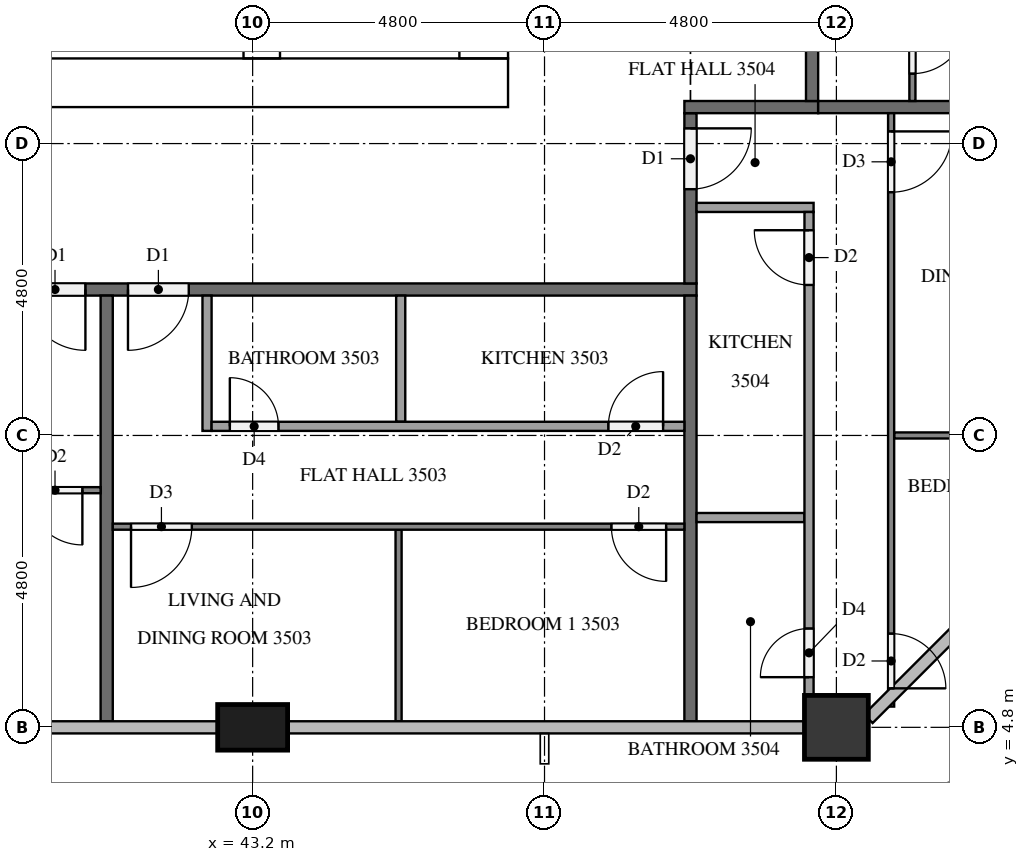
"""IFC4 building model, lengths in metres.
Left out: names, types, materials, properties, quantities, classifications, styles, units other than length and angle.
Written with IfcOpenShell. Run it as: python <this file> out.ifc"""

import sys

from ifc_helpers import new_model, si_unit, direction, frame, frame_2d, origin, origin_2d, place, context, subcontext, project, spatial, rectangle, extrude, element, fill, save


model = new_model("IFC4")
c1 = context("Model", 3, precision=1e-05, world=origin(), true_north=direction((0.0, 1.0)))
c2 = subcontext(c1, "Body", "Model", "MODEL_VIEW")
j1 = project(units=[si_unit("LENGTHUNIT", "METRE"), si_unit("PLANEANGLEUNIT", "RADIAN")], contexts=[c1])
p1 = place(None, origin())
s1 = spatial("IfcSite", under=j1, at=p1, CompositionType="ELEMENT")
p2 = place(p1, origin())
s2 = spatial("IfcBuilding", under=s1, at=p2, CompositionType="ELEMENT")
p3 = place(p2, frame((0.0, 0.0, 136.6)))
s3 = spatial("IfcBuildingStorey", under=s2, at=p3, CompositionType="ELEMENT", Elevation=136.6)
p4 = place(p3, frame((15.0, 15.4, 0.0), z_axis=(0.0, 0.0, 1.0), x_axis=(1.0, 0.0, 0.0)))
e1 = element("IfcWall", 1, at=p4, inside=s3, PredefinedType="SHEAR", context=c2, shape_type="SweptSolid", body=[
    extrude(rectangle(XDim=32.4, YDim=0.8, at=frame_2d((16.2, 0.0))), origin(), (0.0, 0.0, 1.0), 3.2),
])
p5 = place(p4, frame((15.3, 0.0, 0.0)))
e2 = element("IfcOpeningElement", 2, at=p5, cuts=e1, PredefinedType="OPENING", context=c2, shape_type="SweptSolid", body=[
    extrude(rectangle(XDim=1.8, YDim=2.1, at=frame_2d((0.9, 1.05))), frame((0.0, 0.41, 0.0), z_axis=(0.0, -1.0, 0.0), x_axis=(1.0, 0.0, 0.0)), (0.0, 0.0, 1.0), 0.82),
])
p6 = place(p3, frame((47.0, 15.8, 0.0), z_axis=(0.0, 0.0, 1.0), x_axis=(0.0, 1.0, 0.0)))
e3 = element("IfcWall", 3, at=p6, inside=s3, PredefinedType="SHEAR", context=c2, shape_type="SweptSolid", body=[
    extrude(rectangle(XDim=21.2, YDim=0.8, at=frame_2d((10.6, 0.0))), origin(), (0.0, 0.0, 1.0), 3.2),
])
p7 = place(p6, frame((10.3, 0.0, 0.0)))
e4 = element("IfcOpeningElement", 4, at=p7, cuts=e3, PredefinedType="OPENING", context=c2, shape_type="SweptSolid", body=[
    extrude(rectangle(XDim=1.2, YDim=2.1, at=frame_2d((0.6, 1.05))), frame((0.0, 0.41, 0.0), z_axis=(0.0, -1.0, 0.0), x_axis=(1.0, 0.0, 0.0)), (0.0, 0.0, 1.0), 0.82),
])
p8 = place(p3, frame((43.35, 15.8, 0.0), z_axis=(0.0, 0.0, 1.0), x_axis=(0.0, 1.0, 0.0)))
e5 = element("IfcWall", 5, at=p8, inside=s3, PredefinedType="SHEAR", context=c2, shape_type="SweptSolid", body=[
    extrude(rectangle(XDim=8.45, YDim=0.6, at=frame_2d((4.225, 0.0))), origin(), (0.0, 0.0, 1.0), 3.2),
])
p9 = place(p8, frame((0.4, 0.0, 0.0)))
e6 = element("IfcOpeningElement", 6, at=p9, cuts=e5, PredefinedType="OPENING", context=c2, shape_type="SweptSolid", body=[
    extrude(rectangle(XDim=1.2, YDim=2.1, at=frame_2d((0.6, 1.05))), frame((0.0, 0.31, 0.0), z_axis=(0.0, -1.0, 0.0), x_axis=(1.0, 0.0, 0.0)), (0.0, 0.0, 1.0), 0.62),
])
p10 = place(p3, frame((43.2, 4.8, 0.0), z_axis=(0.0, 0.0, 1.0), x_axis=(1.0, 0.0, 0.0)))
e7 = element("IfcColumn", 7, at=p10, inside=s3, PredefinedType="COLUMN", context=c2, shape_type="SweptSolid", body=[
    extrude(rectangle(XDim=1.15, YDim=0.75, at=origin_2d()), origin(), (0.0, 0.0, 1.0), 3.2),
])
p11 = place(p3, frame((52.8, 4.8, 0.0), z_axis=(0.0, 0.0, 1.0), x_axis=(1.0, 0.0, 0.0)))
e8 = element("IfcColumn", 8, at=p11, inside=s3, PredefinedType="COLUMN", context=c2, shape_type="SweptSolid", body=[
    extrude(rectangle(XDim=1.05, YDim=1.05, at=origin_2d()), origin(), (0.0, 0.0, 1.0), 3.2),
])
p12 = place(p3, frame((50.5, 12.0, 0.0), z_axis=(0.0, 0.0, 1.0), x_axis=(-1.0, 0.0, 0.0)))
e9 = element("IfcWall", 9, at=p12, inside=s3, PredefinedType="PARTITIONING", context=c2, shape_type="SweptSolid", body=[
    extrude(rectangle(XDim=38.6, YDim=0.2, at=frame_2d((19.3, 0.0))), origin(), (0.0, 0.0, 1.0), 3.2),
])
p13 = place(p12, frame((24.45, 0.0, 0.0)))
e10 = element("IfcOpeningElement", 10, at=p13, cuts=e9, PredefinedType="OPENING", context=c2, shape_type="SweptSolid", body=[
    extrude(rectangle(XDim=1.0, YDim=2.1, at=frame_2d((0.5, 1.05))), frame((0.0, 0.11, 0.0), z_axis=(0.0, -1.0, 0.0), x_axis=(1.0, 0.0, 0.0)), (0.0, 0.0, 1.0), 0.22),
])
p14 = place(p12, frame((10.05, 0.0, 0.0)))
e11 = element("IfcOpeningElement", 11, at=p14, cuts=e9, PredefinedType="OPENING", context=c2, shape_type="SweptSolid", body=[
    extrude(rectangle(XDim=1.0, YDim=2.1, at=frame_2d((0.5, 1.05))), frame((0.0, 0.11, 0.0), z_axis=(0.0, -1.0, 0.0), x_axis=(1.0, 0.0, 0.0)), (0.0, 0.0, 1.0), 0.22),
])
p15 = place(p12, frame((8.35, 0.0, 0.0)))
e12 = element("IfcOpeningElement", 12, at=p15, cuts=e9, PredefinedType="OPENING", context=c2, shape_type="SweptSolid", body=[
    extrude(rectangle(XDim=1.0, YDim=2.1, at=frame_2d((0.5, 1.05))), frame((0.0, 0.11, 0.0), z_axis=(0.0, -1.0, 0.0), x_axis=(1.0, 0.0, 0.0)), (0.0, 0.0, 1.0), 0.22),
])
p16 = place(p3, frame((50.4, 14.9, 0.0), z_axis=(0.0, 0.0, 1.0), x_axis=(0.0, -1.0, 0.0)))
e13 = element("IfcWall", 13, at=p16, inside=s3, PredefinedType="PARTITIONING", context=c2, shape_type="SweptSolid", body=[
    extrude(rectangle(XDim=2.8, YDim=0.2, at=frame_2d((1.4, 0.0))), origin(), (0.0, 0.0, 1.0), 3.2),
])
p17 = place(p16, frame((0.25, 0.0, 0.0)))
e14 = element("IfcOpeningElement", 14, at=p17, cuts=e13, PredefinedType="OPENING", context=c2, shape_type="SweptSolid", body=[
    extrude(rectangle(XDim=1.0, YDim=2.1, at=frame_2d((0.5, 1.05))), frame((0.0, 0.11, 0.0), z_axis=(0.0, -1.0, 0.0), x_axis=(1.0, 0.0, 0.0)), (0.0, 0.0, 1.0), 0.22),
])
p18 = place(p3, frame((50.3, 15.0, 0.0), z_axis=(0.0, 0.0, 1.0), x_axis=(1.0, 0.0, 0.0)))
e15 = element("IfcWall", 15, at=p18, inside=s3, PredefinedType="PARTITIONING", context=c2, shape_type="SweptSolid", body=[
    extrude(rectangle(XDim=2.2, YDim=0.2, at=frame_2d((1.1, 0.0))), origin(), (0.0, 0.0, 1.0), 3.2),
])
p19 = place(p3, frame((52.4, 37.7, 0.0), z_axis=(0.0, 0.0, 1.0), x_axis=(0.0, -1.0, 0.0)))
e16 = element("IfcWall", 16, at=p19, inside=s3, PredefinedType="PARTITIONING", context=c2, shape_type="SweptSolid", body=[
    extrude(rectangle(XDim=22.6, YDim=0.2, at=frame_2d((11.3, 0.0))), origin(), (0.0, 0.0, 1.0), 3.2),
])
p20 = place(p19, frame((0.25, 0.0, 0.0)))
e17 = element("IfcOpeningElement", 17, at=p20, cuts=e16, PredefinedType="OPENING", context=c2, shape_type="SweptSolid", body=[
    extrude(rectangle(XDim=1.0, YDim=2.1, at=frame_2d((0.5, 1.05))), frame((0.0, 0.11, 0.0), z_axis=(0.0, -1.0, 0.0), x_axis=(1.0, 0.0, 0.0)), (0.0, 0.0, 1.0), 0.22),
])
for number, where, z_axis, x_axis in (
    (18, (40.8, 11.9, 0.0), (0.0, 0.0, 1.0), (0.0, -1.0, 0.0)),
    (19, (50.4, 11.9, 0.0), (0.0, 0.0, 1.0), (0.0, -1.0, 0.0)),
):
    element("IfcWall", number, at=place(p3, frame(where, z_axis=z_axis, x_axis=x_axis)), inside=s3, PredefinedType="PARTITIONING", context=c2, shape_type="SweptSolid", body=[
        extrude(rectangle(XDim=7.0, YDim=0.2, at=frame_2d((3.5, 0.0))), origin(), (0.0, 0.0, 1.0), 3.2),
    ])
p21 = place(p3, frame((52.5, 15.0, 0.0), z_axis=(0.0, 0.0, 1.0), x_axis=(1.0, 0.0, 0.0)))
e20 = element("IfcWall", 20, at=p21, inside=s3, PredefinedType="PARTITIONING", context=c2, shape_type="SweptSolid", body=[
    extrude(rectangle(XDim=5.0, YDim=0.2, at=frame_2d((2.5, 0.0))), origin(), (0.0, 0.0, 1.0), 3.2),
])
p22 = place(p3, frame((40.7, 8.7, 0.0), z_axis=(0.0, 0.0, 1.0), x_axis=(-1.0, 0.0, 0.0)))
e21 = element("IfcWall", 21, at=p22, inside=s3, PredefinedType="PARTITIONING", context=c2, shape_type="SweptSolid", body=[
    extrude(rectangle(XDim=14.2, YDim=0.1, at=frame_2d((7.1, 0.0))), origin(), (0.0, 0.0, 1.0), 3.2),
])
p23 = place(p22, frame((0.3, 0.0, 0.0)))
e22 = element("IfcOpeningElement", 22, at=p23, cuts=e21, PredefinedType="OPENING", context=c2, shape_type="SweptSolid", body=[
    extrude(rectangle(XDim=0.9, YDim=2.1, at=frame_2d((0.45, 1.05))), frame((0.0, 0.06, 0.0), z_axis=(0.0, -1.0, 0.0), x_axis=(1.0, 0.0, 0.0)), (0.0, 0.0, 1.0), 0.12),
])
p24 = place(p22, frame((8.15, 0.0, 0.0)))
e23 = element("IfcOpeningElement", 23, at=p24, cuts=e21, PredefinedType="OPENING", context=c2, shape_type="SweptSolid", body=[
    extrude(rectangle(XDim=1.0, YDim=2.1, at=frame_2d((0.5, 1.05))), frame((0.0, 0.06, 0.0), z_axis=(0.0, -1.0, 0.0), x_axis=(1.0, 0.0, 0.0)), (0.0, 0.0, 1.0), 0.12),
])
p25 = place(p22, frame((9.85, 0.0, 0.0)))
e24 = element("IfcOpeningElement", 24, at=p25, cuts=e21, PredefinedType="OPENING", context=c2, shape_type="SweptSolid", body=[
    extrude(rectangle(XDim=0.9, YDim=2.1, at=frame_2d((0.45, 1.05))), frame((0.0, 0.06, 0.0), z_axis=(0.0, -1.0, 0.0), x_axis=(1.0, 0.0, 0.0)), (0.0, 0.0, 1.0), 0.12),
])
p26 = place(p3, frame((45.6, 8.05, 0.0), z_axis=(0.0, 0.0, 1.0), x_axis=(0.0, -1.0, 0.0)))
e25 = element("IfcWall", 25, at=p26, inside=s3, PredefinedType="PARTITIONING", context=c2, shape_type="SweptSolid", body=[
    extrude(rectangle(XDim=3.15, YDim=0.1, at=frame_2d((1.575, 0.0))), origin(), (0.0, 0.0, 1.0), 3.2),
])
p27 = place(p3, frame((50.3, 8.1, 0.0), z_axis=(0.0, 0.0, 1.0), x_axis=(-1.0, 0.0, 0.0)))
e26 = element("IfcWall", 26, at=p27, inside=s3, PredefinedType="PARTITIONING", context=c2, shape_type="SweptSolid", body=[
    extrude(rectangle(XDim=9.4, YDim=0.1, at=frame_2d((4.7, 0.0))), origin(), (0.0, 0.0, 1.0), 3.2),
])
p28 = place(p27, frame((8.1, 0.0, 0.0)))
e27 = element("IfcOpeningElement", 27, at=p28, cuts=e26, PredefinedType="OPENING", context=c2, shape_type="SweptSolid", body=[
    extrude(rectangle(XDim=1.0, YDim=2.1, at=frame_2d((0.5, 1.05))), frame((0.0, 0.06, 0.0), z_axis=(0.0, -1.0, 0.0), x_axis=(1.0, 0.0, 0.0)), (0.0, 0.0, 1.0), 0.12),
])
p29 = place(p27, frame((0.3, 0.0, 0.0)))
e28 = element("IfcOpeningElement", 28, at=p29, cuts=e26, PredefinedType="OPENING", context=c2, shape_type="SweptSolid", body=[
    extrude(rectangle(XDim=0.9, YDim=2.1, at=frame_2d((0.45, 1.05))), frame((0.0, 0.06, 0.0), z_axis=(0.0, -1.0, 0.0), x_axis=(1.0, 0.0, 0.0)), (0.0, 0.0, 1.0), 0.12),
])
p30 = place(p3, frame((45.635, 11.9, 0.0), z_axis=(0.0, 0.0, 1.0), x_axis=(0.0, -1.0, 0.0)))
e29 = element("IfcWall", 29, at=p30, inside=s3, PredefinedType="PARTITIONING", context=c2, shape_type="SweptSolid", body=[
    extrude(rectangle(XDim=2.075, YDim=0.15, at=frame_2d((1.038, 0.0))), origin(), (0.0, 0.0, 1.0), 3.2),
])
p31 = place(p3, frame((42.45, 11.9, 0.0), z_axis=(0.0, 0.0, 1.0), x_axis=(0.0, -1.0, 0.0)))
e30 = element("IfcWall", 30, at=p31, inside=s3, PredefinedType="PARTITIONING", context=c2, shape_type="SweptSolid", body=[
    extrude(rectangle(XDim=2.225, YDim=0.15, at=frame_2d((1.112, 0.0))), origin(), (0.0, 0.0, 1.0), 3.2),
])
p32 = place(p3, frame((42.525, 9.75, 0.0), z_axis=(0.0, 0.0, 1.0), x_axis=(1.0, 0.0, 0.0)))
e31 = element("IfcWall", 31, at=p32, inside=s3, PredefinedType="PARTITIONING", context=c2, shape_type="SweptSolid", body=[
    extrude(rectangle(XDim=7.775, YDim=0.15, at=frame_2d((3.888, 0.0))), origin(), (0.0, 0.0, 1.0), 3.2),
])
p33 = place(p32, frame((0.3, 0.0, 0.0)))
e32 = element("IfcOpeningElement", 32, at=p33, cuts=e31, PredefinedType="OPENING", context=c2, shape_type="SweptSolid", body=[
    extrude(rectangle(XDim=0.8, YDim=2.1, at=frame_2d((0.4, 1.05))), frame((0.0, 0.085, 0.0), z_axis=(0.0, -1.0, 0.0), x_axis=(1.0, 0.0, 0.0)), (0.0, 0.0, 1.0), 0.17),
])
p34 = place(p32, frame((6.525, 0.0, 0.0)))
e33 = element("IfcOpeningElement", 33, at=p34, cuts=e31, PredefinedType="OPENING", context=c2, shape_type="SweptSolid", body=[
    extrude(rectangle(XDim=0.9, YDim=2.1, at=frame_2d((0.45, 1.05))), frame((0.0, 0.085, 0.0), z_axis=(0.0, -1.0, 0.0), x_axis=(1.0, 0.0, 0.0)), (0.0, 0.0, 1.0), 0.17),
])
p35 = place(p3, frame((53.75, 9.6, 0.0), z_axis=(0.0, 0.0, 1.0), x_axis=(1.0, 0.0, 0.0)))
e34 = element("IfcWall", 34, at=p35, inside=s3, PredefinedType="PARTITIONING", context=c2, shape_type="SweptSolid", body=[
    extrude(rectangle(XDim=3.325, YDim=0.1, at=frame_2d((1.663, 0.0))), origin(), (0.0, 0.0, 1.0), 3.2),
])
p36 = place(p3, frame((53.7, 14.9, 0.0), z_axis=(0.0, 0.0, 1.0), x_axis=(0.0, -1.0, 0.0)))
e35 = element("IfcWall", 35, at=p36, inside=s3, PredefinedType="PARTITIONING", context=c2, shape_type="SweptSolid", body=[
    extrude(rectangle(XDim=9.759, YDim=0.1, at=frame_2d((4.879, 0.0))), origin(), (0.0, 0.0, 1.0), 3.2),
])
p37 = place(p36, frame((0.3, 0.0, 0.0)))
e36 = element("IfcOpeningElement", 36, at=p37, cuts=e35, PredefinedType="OPENING", context=c2, shape_type="SweptSolid", body=[
    extrude(rectangle(XDim=1.0, YDim=2.1, at=frame_2d((0.5, 1.05))), frame((0.0, 0.06, 0.0), z_axis=(0.0, -1.0, 0.0), x_axis=(1.0, 0.0, 0.0)), (0.0, 0.0, 1.0), 0.12),
])
p38 = place(p36, frame((8.559, 0.0, 0.0)))
e37 = element("IfcOpeningElement", 37, at=p38, cuts=e35, PredefinedType="OPENING", context=c2, shape_type="SweptSolid", body=[
    extrude(rectangle(XDim=0.9, YDim=2.1, at=frame_2d((0.45, 1.05))), frame((0.0, 0.06, 0.0), z_axis=(0.0, -1.0, 0.0), x_axis=(1.0, 0.0, 0.0)), (0.0, 0.0, 1.0), 0.12),
])
p39 = place(p3, frame((50.5, 8.25, 0.0), z_axis=(0.0, 0.0, 1.0), x_axis=(1.0, 0.0, 0.0)))
e38 = element("IfcWall", 38, at=p39, inside=s3, PredefinedType="PARTITIONING", context=c2, shape_type="SweptSolid", body=[
    extrude(rectangle(XDim=1.775, YDim=0.15, at=frame_2d((0.887, 0.0))), origin(), (0.0, 0.0, 1.0), 3.2),
])
p40 = place(p3, frame((50.5, 13.35, 0.0), z_axis=(0.0, 0.0, 1.0), x_axis=(1.0, 0.0, 0.0)))
e39 = element("IfcWall", 39, at=p40, inside=s3, PredefinedType="PARTITIONING", context=c2, shape_type="SweptSolid", body=[
    extrude(rectangle(XDim=1.925, YDim=0.15, at=frame_2d((0.962, 0.0))), origin(), (0.0, 0.0, 1.0), 3.2),
])
p41 = place(p3, frame((52.35, 5.325, 0.0), z_axis=(0.0, 0.0, 1.0), x_axis=(0.0, 1.0, 0.0)))
e40 = element("IfcWall", 40, at=p41, inside=s3, PredefinedType="PARTITIONING", context=c2, shape_type="SweptSolid", body=[
    extrude(rectangle(XDim=7.95, YDim=0.15, at=frame_2d((3.975, 0.0))), origin(), (0.0, 0.0, 1.0), 3.2),
])
p42 = place(p41, frame((6.75, 0.0, 0.0)))
e41 = element("IfcOpeningElement", 41, at=p42, cuts=e40, PredefinedType="OPENING", context=c2, shape_type="SweptSolid", body=[
    extrude(rectangle(XDim=0.9, YDim=2.1, at=frame_2d((0.45, 1.05))), frame((0.0, 0.085, 0.0), z_axis=(0.0, -1.0, 0.0), x_axis=(1.0, 0.0, 0.0)), (0.0, 0.0, 1.0), 0.17),
])
p43 = place(p41, frame((0.3, 0.0, 0.0)))
e42 = element("IfcOpeningElement", 42, at=p43, cuts=e40, PredefinedType="OPENING", context=c2, shape_type="SweptSolid", body=[
    extrude(rectangle(XDim=0.8, YDim=2.1, at=frame_2d((0.4, 1.05))), frame((0.0, 0.085, 0.0), z_axis=(0.0, -1.0, 0.0), x_axis=(1.0, 0.0, 0.0)), (0.0, 0.0, 1.0), 0.17),
])
p44 = place(p3, frame((54.05, 37.7, 0.0), z_axis=(0.0, 0.0, 1.0), x_axis=(0.0, -1.0, 0.0)))
e43 = element("IfcWall", 43, at=p44, inside=s3, PredefinedType="PARTITIONING", context=c2, shape_type="SweptSolid", body=[
    extrude(rectangle(XDim=22.6, YDim=0.1, at=frame_2d((11.3, 0.0))), origin(), (0.0, 0.0, 1.0), 3.2),
])
p45 = place(p44, frame((2.85, 0.0, 0.0)))
e44 = element("IfcOpeningElement", 44, at=p45, cuts=e43, PredefinedType="OPENING", context=c2, shape_type="SweptSolid", body=[
    extrude(rectangle(XDim=0.9, YDim=2.1, at=frame_2d((0.45, 1.05))), frame((0.0, 0.06, 0.0), z_axis=(0.0, -1.0, 0.0), x_axis=(1.0, 0.0, 0.0)), (0.0, 0.0, 1.0), 0.12),
])
p46 = place(p44, frame((4.45, 0.0, 0.0)))
e45 = element("IfcOpeningElement", 45, at=p46, cuts=e43, PredefinedType="OPENING", context=c2, shape_type="SweptSolid", body=[
    extrude(rectangle(XDim=0.8, YDim=2.1, at=frame_2d((0.4, 1.05))), frame((0.0, 0.06, 0.0), z_axis=(0.0, -1.0, 0.0), x_axis=(1.0, 0.0, 0.0)), (0.0, 0.0, 1.0), 0.12),
])
p47 = place(p44, frame((10.05, 0.0, 0.0)))
e46 = element("IfcOpeningElement", 46, at=p47, cuts=e43, PredefinedType="OPENING", context=c2, shape_type="SweptSolid", body=[
    extrude(rectangle(XDim=0.9, YDim=2.1, at=frame_2d((0.45, 1.05))), frame((0.0, 0.06, 0.0), z_axis=(0.0, -1.0, 0.0), x_axis=(1.0, 0.0, 0.0)), (0.0, 0.0, 1.0), 0.12),
])
p48 = place(p44, frame((11.65, 0.0, 0.0)))
e47 = element("IfcOpeningElement", 47, at=p48, cuts=e43, PredefinedType="OPENING", context=c2, shape_type="SweptSolid", body=[
    extrude(rectangle(XDim=0.9, YDim=2.1, at=frame_2d((0.45, 1.05))), frame((0.0, 0.06, 0.0), z_axis=(0.0, -1.0, 0.0), x_axis=(1.0, 0.0, 0.0)), (0.0, 0.0, 1.0), 0.12),
])
p49 = place(p44, frame((19.55, 0.0, 0.0)))
e48 = element("IfcOpeningElement", 48, at=p49, cuts=e43, PredefinedType="OPENING", context=c2, shape_type="SweptSolid", body=[
    extrude(rectangle(XDim=1.0, YDim=2.1, at=frame_2d((0.5, 1.05))), frame((0.0, 0.06, 0.0), z_axis=(0.0, -1.0, 0.0), x_axis=(1.0, 0.0, 0.0)), (0.0, 0.0, 1.0), 0.12),
])
p50 = place(p44, frame((21.25, 0.0, 0.0)))
e49 = element("IfcOpeningElement", 49, at=p50, cuts=e43, PredefinedType="OPENING", context=c2, shape_type="SweptSolid", body=[
    extrude(rectangle(XDim=0.9, YDim=2.1, at=frame_2d((0.45, 1.05))), frame((0.0, 0.06, 0.0), z_axis=(0.0, -1.0, 0.0), x_axis=(1.0, 0.0, 0.0)), (0.0, 0.0, 1.0), 0.12),
])
p51 = place(p14, origin())
e50 = element("IfcDoor", 50, at=p51, inside=s3, OperationType="SINGLE_SWING_LEFT", PredefinedType="DOOR", context=c2, shape_type="SweptSolid", body=[
    extrude(rectangle(XDim=1.0, YDim=2.1, at=frame_2d((0.5, 1.05))), frame((0.0, 0.025, 0.0), z_axis=(0.0, -1.0, 0.0), x_axis=(1.0, 0.0, 0.0)), (0.0, 0.0, 1.0), 0.05),
])
fill(e11, e50)
p52 = place(p15, origin())
e51 = element("IfcDoor", 51, at=p52, inside=s3, OperationType="SINGLE_SWING_RIGHT", PredefinedType="DOOR", context=c2, shape_type="SweptSolid", body=[
    extrude(rectangle(XDim=1.0, YDim=2.1, at=frame_2d((0.5, 1.05))), frame((0.0, 0.025, 0.0), z_axis=(0.0, -1.0, 0.0), x_axis=(1.0, 0.0, 0.0)), (0.0, 0.0, 1.0), 0.05),
])
fill(e12, e51)
p53 = place(p17, origin())
e52 = element("IfcDoor", 52, at=p53, inside=s3, OperationType="SINGLE_SWING_LEFT", PredefinedType="DOOR", context=c2, shape_type="SweptSolid", body=[
    extrude(rectangle(XDim=1.0, YDim=2.1, at=frame_2d((0.5, 1.05))), frame((0.0, 0.025, 0.0), z_axis=(0.0, -1.0, 0.0), x_axis=(1.0, 0.0, 0.0)), (0.0, 0.0, 1.0), 0.05),
])
fill(e14, e52)
p54 = place(p23, origin())
e53 = element("IfcDoor", 53, at=p54, inside=s3, OperationType="SINGLE_SWING_LEFT", PredefinedType="DOOR", context=c2, shape_type="SweptSolid", body=[
    extrude(rectangle(XDim=0.9, YDim=2.1, at=frame_2d((0.45, 1.05))), frame((0.0, 0.025, 0.0), z_axis=(0.0, -1.0, 0.0), x_axis=(1.0, 0.0, 0.0)), (0.0, 0.0, 1.0), 0.05),
])
fill(e22, e53)
p55 = place(p28, origin())
e54 = element("IfcDoor", 54, at=p55, inside=s3, OperationType="SINGLE_SWING_RIGHT", PredefinedType="DOOR", context=c2, shape_type="SweptSolid", body=[
    extrude(rectangle(XDim=1.0, YDim=2.1, at=frame_2d((0.5, 1.05))), frame((0.0, 0.025, 0.0), z_axis=(0.0, -1.0, 0.0), x_axis=(1.0, 0.0, 0.0)), (0.0, 0.0, 1.0), 0.05),
])
fill(e27, e54)
p56 = place(p29, origin())
e55 = element("IfcDoor", 55, at=p56, inside=s3, OperationType="SINGLE_SWING_LEFT", PredefinedType="DOOR", context=c2, shape_type="SweptSolid", body=[
    extrude(rectangle(XDim=0.9, YDim=2.1, at=frame_2d((0.45, 1.05))), frame((0.0, 0.025, 0.0), z_axis=(0.0, -1.0, 0.0), x_axis=(1.0, 0.0, 0.0)), (0.0, 0.0, 1.0), 0.05),
])
fill(e28, e55)
p57 = place(p33, origin())
e56 = element("IfcDoor", 56, at=p57, inside=s3, OperationType="SINGLE_SWING_LEFT", PredefinedType="DOOR", context=c2, shape_type="SweptSolid", body=[
    extrude(rectangle(XDim=0.8, YDim=2.1, at=frame_2d((0.4, 1.05))), frame((0.0, 0.025, 0.0), z_axis=(0.0, -1.0, 0.0), x_axis=(1.0, 0.0, 0.0)), (0.0, 0.0, 1.0), 0.05),
])
fill(e32, e56)
p58 = place(p34, origin())
e57 = element("IfcDoor", 57, at=p58, inside=s3, OperationType="SINGLE_SWING_RIGHT", PredefinedType="DOOR", context=c2, shape_type="SweptSolid", body=[
    extrude(rectangle(XDim=0.9, YDim=2.1, at=frame_2d((0.45, 1.05))), frame((0.0, 0.025, 0.0), z_axis=(0.0, -1.0, 0.0), x_axis=(1.0, 0.0, 0.0)), (0.0, 0.0, 1.0), 0.05),
])
fill(e33, e57)
p59 = place(p37, origin())
e58 = element("IfcDoor", 58, at=p59, inside=s3, OperationType="SINGLE_SWING_LEFT", PredefinedType="DOOR", context=c2, shape_type="SweptSolid", body=[
    extrude(rectangle(XDim=1.0, YDim=2.1, at=frame_2d((0.5, 1.05))), frame((0.0, 0.025, 0.0), z_axis=(0.0, -1.0, 0.0), x_axis=(1.0, 0.0, 0.0)), (0.0, 0.0, 1.0), 0.05),
])
fill(e36, e58)
p60 = place(p38, origin())
e59 = element("IfcDoor", 59, at=p60, inside=s3, OperationType="SINGLE_SWING_RIGHT", PredefinedType="DOOR", context=c2, shape_type="SweptSolid", body=[
    extrude(rectangle(XDim=0.9, YDim=2.1, at=frame_2d((0.45, 1.05))), frame((0.0, 0.025, 0.0), z_axis=(0.0, -1.0, 0.0), x_axis=(1.0, 0.0, 0.0)), (0.0, 0.0, 1.0), 0.05),
])
fill(e37, e59)
p61 = place(p42, origin())
e60 = element("IfcDoor", 60, at=p61, inside=s3, OperationType="SINGLE_SWING_RIGHT", PredefinedType="DOOR", context=c2, shape_type="SweptSolid", body=[
    extrude(rectangle(XDim=0.9, YDim=2.1, at=frame_2d((0.45, 1.05))), frame((0.0, 0.025, 0.0), z_axis=(0.0, -1.0, 0.0), x_axis=(1.0, 0.0, 0.0)), (0.0, 0.0, 1.0), 0.05),
])
fill(e41, e60)
p62 = place(p43, origin())
e61 = element("IfcDoor", 61, at=p62, inside=s3, OperationType="SINGLE_SWING_LEFT", PredefinedType="DOOR", context=c2, shape_type="SweptSolid", body=[
    extrude(rectangle(XDim=0.8, YDim=2.1, at=frame_2d((0.4, 1.05))), frame((0.0, 0.025, 0.0), z_axis=(0.0, -1.0, 0.0), x_axis=(1.0, 0.0, 0.0)), (0.0, 0.0, 1.0), 0.05),
])
fill(e42, e61)
p63 = place(p50, origin())
e62 = element("IfcDoor", 62, at=p63, inside=s3, OperationType="SINGLE_SWING_LEFT", PredefinedType="DOOR", context=c2, shape_type="SweptSolid", body=[
    extrude(rectangle(XDim=0.9, YDim=2.1, at=frame_2d((0.45, 1.05))), frame((0.0, 0.025, 0.0), z_axis=(0.0, -1.0, 0.0), x_axis=(1.0, 0.0, 0.0)), (0.0, 0.0, 1.0), 0.05),
])
fill(e49, e62)
save(model, sys.argv[1])
